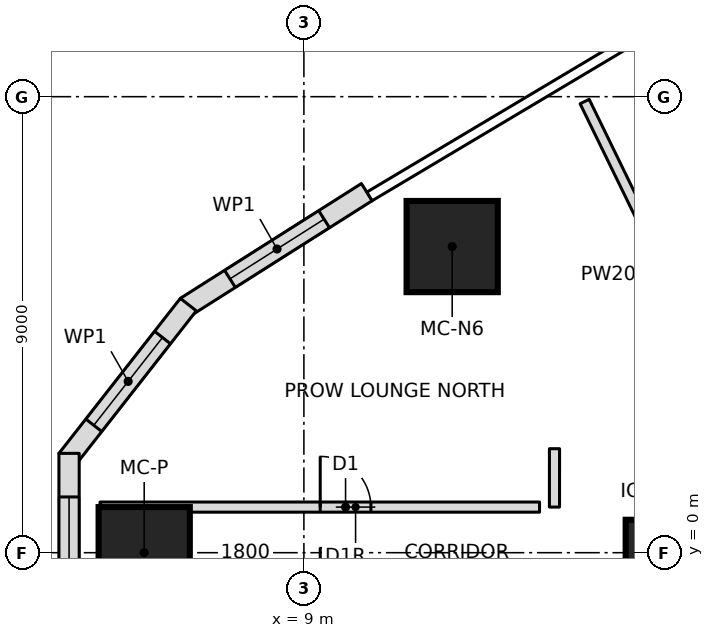
"""IFC4 building model, lengths in metres.
Left out: names, types, materials, properties, quantities, classifications, styles, units other than length and angle.
Written with IfcOpenShell. Run it as: python <this file> out.ifc"""

import sys

from ifc_helpers import new_model, si_unit, direction, frame, frame_2d, origin, origin_2d, place, context, subcontext, project, spatial, polyline, rectangle, outline, extrude, element, fill, save


model = new_model("IFC4")
c1 = context("Model", 3, precision=1e-05, world=origin(), true_north=direction((0.0, 1.0)))
c2 = subcontext(c1, "Body", "Model", "MODEL_VIEW")
j1 = project(units=[si_unit("LENGTHUNIT", "METRE"), si_unit("PLANEANGLEUNIT", "RADIAN")], contexts=[c1])
p1 = place(None, origin())
s1 = spatial("IfcSite", under=j1, at=p1, CompositionType="ELEMENT")
p2 = place(p1, origin())
s2 = spatial("IfcBuilding", under=s1, at=p2, CompositionType="ELEMENT")
p3 = place(p2, frame((0.0, 0.0, 39.6)))
s3 = spatial("IfcBuildingStorey", under=s2, at=p3, CompositionType="ELEMENT", Elevation=39.6)
for number, where, z_axis, x_axis in (
    (1, (5.848, 0.0, 0.0), (0.0, 0.0, 1.0), (1.0, 0.0, 0.0)),
    (2, (11.927, 6.042, 0.0), (0.0, 0.0, 1.0), (1.0, 0.0, 0.0)),
):
    element("IfcColumn", number, at=place(p3, frame(where, z_axis=z_axis, x_axis=x_axis)), inside=s3, PredefinedType="COLUMN", context=c2, shape_type="SweptSolid", body=[
        extrude(rectangle(XDim=1.8, YDim=1.8, at=origin_2d()), origin(), (0.0, 0.0, 1.0), 3.55),
    ])
p4 = place(p3, frame((16.0, 0.0, 0.0), z_axis=(0.0, 0.0, 1.0), x_axis=(1.0, 0.0, 0.0)))
e3 = element("IfcColumn", 3, at=p4, inside=s3, PredefinedType="COLUMN", context=c2, shape_type="SweptSolid", body=[
    extrude(rectangle(XDim=1.3, YDim=1.3, at=origin_2d()), origin(), (0.0, 0.0, 1.0), 3.55),
])
p5 = place(p3, frame((10.242, 7.116, 0.0), z_axis=(0.0, 0.0, 1.0), x_axis=(-0.844551578623, -0.535474211372, 0.0)))
e4 = element("IfcWall", 4, at=p5, inside=s3, PredefinedType="NOTDEFINED", context=c2, shape_type="SweptSolid", body=[
    extrude(outline(polyline([(0.0, -0.2), (4.23, -0.2), (4.162, 0.2), (0.0, 0.2), (0.0, -0.2)])), origin(), (0.0, 0.0, 1.0), 3.25),
])
p6 = place(p5, frame((0.998, 0.0, 0.6)))
e5 = element("IfcOpeningElement", 5, at=p6, cuts=e4, PredefinedType="OPENING", context=c2, shape_type="SweptSolid", body=[
    extrude(outline(polyline([(0.0, 1.35), (0.084, 1.771), (0.322, 2.128), (0.679, 2.366), (1.1, 2.45), (1.521, 2.366), (1.878, 2.128), (2.116, 1.771), (2.2, 1.35), (2.2, 1.1), (2.116, 0.679), (1.878, 0.322), (1.521, 0.084), (1.1, 0.0), (0.679, 0.084), (0.322, 0.322), (0.084, 0.679), (0.0, 1.1), (0.0, 1.35)])), frame((0.0, 0.21, 0.0), z_axis=(0.0, -1.0, 0.0), x_axis=(1.0, 0.0, 0.0)), (0.0, 0.0, 1.0), 0.42),
])
p7 = place(p3, frame((6.698, 4.87, 0.0), z_axis=(0.0, 0.0, 1.0), x_axis=(-0.616586647779, -0.787287054245, 0.0)))
e6 = element("IfcWall", 6, at=p7, inside=s3, PredefinedType="NOTDEFINED", context=c2, shape_type="SweptSolid", body=[
    extrude(outline(polyline([(-0.034, -0.2), (3.852, -0.2), (3.714, 0.2), (0.034, 0.2), (-0.034, -0.2)])), origin(), (0.0, 0.0, 1.0), 3.25),
])
p8 = place(p7, frame((0.792, 0.0, 0.6)))
e7 = element("IfcOpeningElement", 7, at=p8, cuts=e6, PredefinedType="OPENING", context=c2, shape_type="SweptSolid", body=[
    extrude(outline(polyline([(0.0, 1.35), (0.084, 1.771), (0.322, 2.128), (0.679, 2.366), (1.1, 2.45), (1.521, 2.366), (1.878, 2.128), (2.116, 1.771), (2.2, 1.35), (2.2, 1.1), (2.116, 0.679), (1.878, 0.322), (1.521, 0.084), (1.1, 0.0), (0.679, 0.084), (0.322, 0.322), (0.084, 0.679), (0.0, 1.1), (0.0, 1.35)])), frame((0.0, 0.21, 0.0), z_axis=(0.0, -1.0, 0.0), x_axis=(1.0, 0.0, 0.0)), (0.0, 0.0, 1.0), 0.42),
])
p9 = place(p3, frame((4.365, 1.891, 0.0), z_axis=(0.0, 0.0, 1.0), x_axis=(0.0, -1.0, 0.0)))
e8 = element("IfcWall", 8, at=p9, inside=s3, PredefinedType="NOTDEFINED", context=c2, shape_type="SweptSolid", body=[
    extrude(outline(polyline([(-0.069, -0.2), (3.852, -0.2), (3.714, 0.2), (0.069, 0.2), (-0.069, -0.2)])), origin(), (0.0, 0.0, 1.0), 3.25),
])
p10 = place(p9, frame((0.792, 0.0, 0.6)))
e9 = element("IfcOpeningElement", 9, at=p10, cuts=e8, PredefinedType="OPENING", context=c2, shape_type="SweptSolid", body=[
    extrude(outline(polyline([(0.0, 1.35), (0.084, 1.771), (0.322, 2.128), (0.679, 2.366), (1.1, 2.45), (1.521, 2.366), (1.878, 2.128), (2.116, 1.771), (2.2, 1.35), (2.2, 1.1), (2.116, 0.679), (1.878, 0.322), (1.521, 0.084), (1.1, 0.0), (0.679, 0.084), (0.322, 0.322), (0.084, 0.679), (0.0, 1.1), (0.0, 1.35)])), frame((0.0, 0.21, 0.0), z_axis=(0.0, -1.0, 0.0), x_axis=(1.0, 0.0, 0.0)), (0.0, 0.0, 1.0), 0.42),
])
p11 = place(p3, frame((17.882, 2.05, 0.0), z_axis=(0.0, 0.0, 1.0), x_axis=(-0.438213564788, 0.898870887078, 0.0)))
e10 = element("IfcWall", 10, at=p11, inside=s3, PredefinedType="PARTITIONING", context=c2, shape_type="SweptSolid", body=[
    extrude(rectangle(XDim=7.625, YDim=0.2, at=frame_2d((3.813, 0.0))), origin(), (0.0, 0.0, 1.0), 3.25),
])
p12 = place(p3, frame((4.977, 0.9, 0.0), z_axis=(0.0, 0.0, 1.0), x_axis=(1.0, 0.0, 0.0)))
e11 = element("IfcWall", 11, at=p12, inside=s3, PredefinedType="PARTITIONING", context=c2, shape_type="SweptSolid", body=[
    extrude(rectangle(XDim=8.673, YDim=0.2, at=frame_2d((4.336, 0.0))), origin(), (0.0, 0.0, 1.0), 3.25),
])
p13 = place(p12, frame((4.345, 0.0, 0.0)))
e12 = element("IfcOpeningElement", 12, at=p13, cuts=e11, PredefinedType="OPENING", context=c2, shape_type="SweptSolid", body=[
    extrude(rectangle(XDim=1.0, YDim=2.1, at=frame_2d((0.5, 1.05))), frame((0.0, 0.11, 0.0), z_axis=(0.0, -1.0, 0.0), x_axis=(1.0, 0.0, 0.0)), (0.0, 0.0, 1.0), 0.22),
])
p14 = place(p3, frame((13.946, 2.052, 0.0), z_axis=(0.0, 0.0, 1.0), x_axis=(-0.000423818568, -0.999999910189, 0.0)))
e13 = element("IfcWall", 13, at=p14, inside=s3, PredefinedType="PARTITIONING", context=c2, shape_type="SweptSolid", body=[
    extrude(rectangle(XDim=1.152, YDim=0.2, at=frame_2d((0.576, 0.0))), origin(), (0.0, 0.0, 1.0), 3.25),
])
p15 = place(p6, origin())
e14 = element("IfcWindow", 14, at=p15, inside=s3, PartitioningType="SINGLE_PANEL", PredefinedType="WINDOW", context=c2, shape_type="SweptSolid", body=[
    extrude(outline(polyline([(0.0, 1.35), (0.084, 1.771), (0.322, 2.128), (0.679, 2.366), (1.1, 2.45), (1.521, 2.366), (1.878, 2.128), (2.116, 1.771), (2.2, 1.35), (2.2, 1.1), (2.116, 0.679), (1.878, 0.322), (1.521, 0.084), (1.1, 0.0), (0.679, 0.084), (0.322, 0.322), (0.084, 0.679), (0.0, 1.1), (0.0, 1.35)])), frame((0.0, 0.17, 0.0), z_axis=(0.0, -1.0, 0.0), x_axis=(1.0, 0.0, 0.0)), (0.0, 0.0, 1.0), 0.06),
])
fill(e5, e14)
p16 = place(p8, origin())
e15 = element("IfcWindow", 15, at=p16, inside=s3, PartitioningType="SINGLE_PANEL", PredefinedType="WINDOW", context=c2, shape_type="SweptSolid", body=[
    extrude(outline(polyline([(0.0, 1.35), (0.084, 1.771), (0.322, 2.128), (0.679, 2.366), (1.1, 2.45), (1.521, 2.366), (1.878, 2.128), (2.116, 1.771), (2.2, 1.35), (2.2, 1.1), (2.116, 0.679), (1.878, 0.322), (1.521, 0.084), (1.1, 0.0), (0.679, 0.084), (0.322, 0.322), (0.084, 0.679), (0.0, 1.1), (0.0, 1.35)])), frame((0.0, 0.17, 0.0), z_axis=(0.0, -1.0, 0.0), x_axis=(1.0, 0.0, 0.0)), (0.0, 0.0, 1.0), 0.06),
])
fill(e7, e15)
p17 = place(p10, origin())
e16 = element("IfcWindow", 16, at=p17, inside=s3, PartitioningType="SINGLE_PANEL", PredefinedType="WINDOW", context=c2, shape_type="SweptSolid", body=[
    extrude(outline(polyline([(0.0, 1.35), (0.084, 1.771), (0.322, 2.128), (0.679, 2.366), (1.1, 2.45), (1.521, 2.366), (1.878, 2.128), (2.116, 1.771), (2.2, 1.35), (2.2, 1.1), (2.116, 0.679), (1.878, 0.322), (1.521, 0.084), (1.1, 0.0), (0.679, 0.084), (0.322, 0.322), (0.084, 0.679), (0.0, 1.1), (0.0, 1.35)])), frame((0.0, 0.17, 0.0), z_axis=(0.0, -1.0, 0.0), x_axis=(1.0, 0.0, 0.0)), (0.0, 0.0, 1.0), 0.06),
])
fill(e9, e16)
p18 = place(p13, origin())
e17 = element("IfcDoor", 17, at=p18, inside=s3, OperationType="SINGLE_SWING_LEFT", PredefinedType="DOOR", context=c2, shape_type="SweptSolid", body=[
    extrude(rectangle(XDim=1.0, YDim=2.1, at=frame_2d((0.5, 1.05))), frame((0.0, 0.025, 0.0), z_axis=(0.0, -1.0, 0.0), x_axis=(1.0, 0.0, 0.0)), (0.0, 0.0, 1.0), 0.05),
])
fill(e12, e17)
save(model, sys.argv[1])
